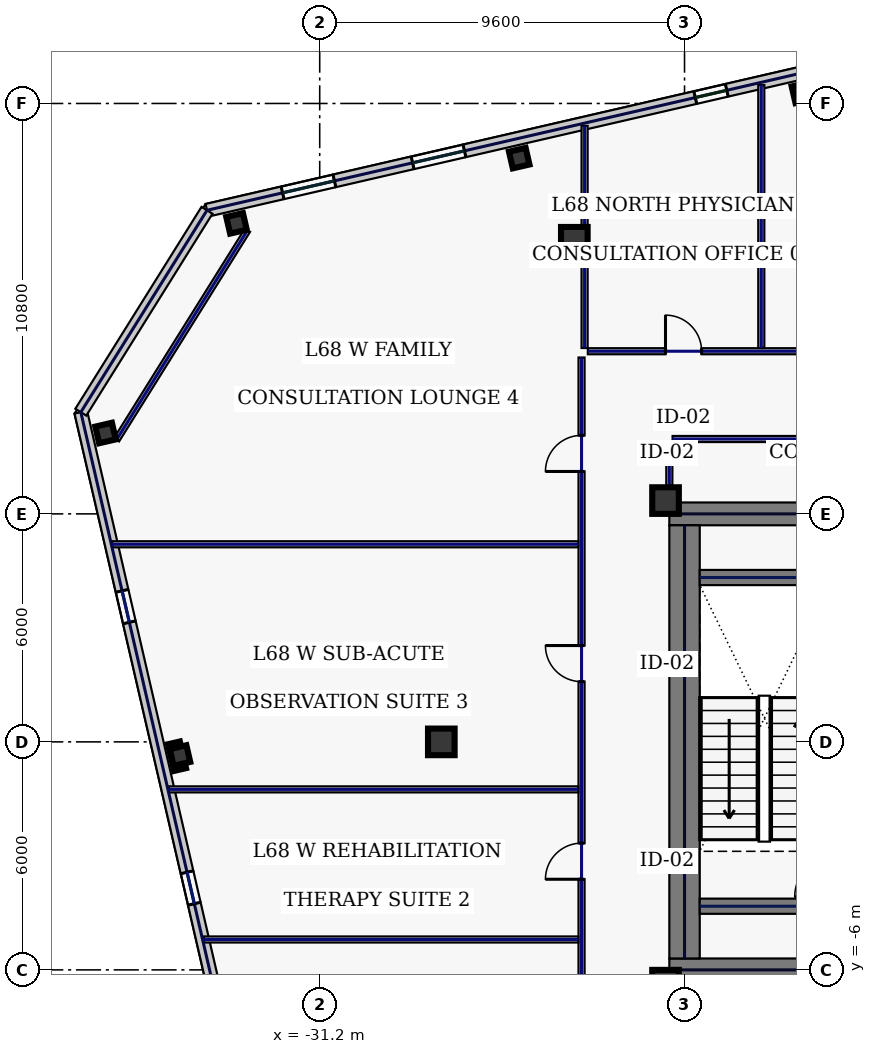
"""IFC4 building model, lengths in metres.
Left out: names, types, materials, properties, quantities, classifications, styles, units other than length and angle.
Written with IfcOpenShell. Run it as: python <this file> out.ifc"""

import sys

from ifc_helpers import new_model, si_unit, direction, frame, frame_2d, origin, origin_2d, place, context, subcontext, project, spatial, rectangle, hollow_rectangle, extrude, element, fill, save


model = new_model("IFC4")
c1 = context("Model", 3, precision=1e-05, world=origin(), true_north=direction((0.0, 1.0)))
c2 = subcontext(c1, "Body", "Model", "MODEL_VIEW")
j1 = project(units=[si_unit("LENGTHUNIT", "METRE"), si_unit("PLANEANGLEUNIT", "RADIAN")], contexts=[c1])
p1 = place(None, origin())
s1 = spatial("IfcSite", under=j1, at=p1, CompositionType="ELEMENT")
p2 = place(p1, origin())
s2 = spatial("IfcBuilding", under=s1, at=p2, CompositionType="ELEMENT")
p3 = place(p2, frame((0.0, 0.0, 293.0)))
s3 = spatial("IfcBuildingStorey", under=s2, at=p3, CompositionType="ELEMENT", Elevation=293.0)
for number, where, z_axis, x_axis in (
    (1, (-22.0, 6.0, 0.0), (0.0, 0.0, 1.0), (1.0, 0.0, 0.0)),
    (2, (-22.0, -6.0, 0.0), (0.0, 0.0, 1.0), (1.0, 0.0, 0.0)),
):
    element("IfcWall", number, at=place(p3, frame(where, z_axis=z_axis, x_axis=x_axis)), inside=s3, PredefinedType="SHEAR", context=c2, shape_type="SweptSolid", body=[
        extrude(rectangle(XDim=11.5, YDim=0.6, at=frame_2d((5.75, 0.0))), origin(), (0.0, 0.0, 1.0), 3.74),
    ])
p4 = place(p3, frame((-21.6, -5.7, 0.0), z_axis=(0.0, 0.0, 1.0), x_axis=(0.0, 1.0, 0.0)))
e3 = element("IfcWall", 3, at=p4, inside=s3, PredefinedType="SHEAR", context=c2, shape_type="SweptSolid", body=[
    extrude(rectangle(XDim=11.4, YDim=0.8, at=frame_2d((5.7, 0.0))), origin(), (0.0, 0.0, 1.0), 3.74),
])
for number, where, z_axis, x_axis in (
    (4, (-21.2, -4.325, 0.0), (0.0, 0.0, 1.0), (1.0, 0.0, 0.0)),
    (5, (-21.2, 4.325, 0.0), (0.0, 0.0, 1.0), (1.0, 0.0, 0.0)),
):
    element("IfcWall", number, at=place(p3, frame(where, z_axis=z_axis, x_axis=x_axis)), inside=s3, PredefinedType="SHEAR", context=c2, shape_type="SweptSolid", body=[
        extrude(rectangle(XDim=3.4, YDim=0.4, at=frame_2d((1.7, 0.0))), origin(), (0.0, 0.0, 1.0), 3.74),
    ])
for number, where, z_axis, x_axis in (
    (6, (-22.1, -6.35, 0.0), (0.0, 0.0, 1.0), (1.0, 0.0, 0.0)),
    (7, (-22.1, 6.35, 0.0), (0.0, 0.0, 1.0), (1.0, 0.0, 0.0)),
    (8, (-24.5, 13.2, 0.0), (0.0, 0.0, 1.0), (1.0, 0.0, 0.0)),
    (9, (-28.0, 0.0, 0.0), (0.0, 0.0, 1.0), (1.0, 0.0, 0.0)),
):
    element("IfcColumn", number, at=place(p3, frame(where, z_axis=z_axis, x_axis=x_axis)), inside=s3, PredefinedType="COLUMN", context=c2, shape_type="SweptSolid", body=[
        extrude(hollow_rectangle(XDim=0.7, YDim=0.7, WallThickness=0.032, at=origin_2d()), origin(), (0.0, 0.0, 1.0), 3.74),
    ])
for number, where, z_axis, x_axis in (
    (10, (-18.511, 17.08, 0.0), (0.0, 0.0, 1.0), (0.974, 0.225, 0.0)),
    (11, (-25.95, 15.362, 0.0), (0.0, 0.0, 1.0), (0.974, 0.225, 0.0)),
    (12, (-33.389, 13.645, 0.0), (0.0, 0.0, 1.0), (0.974, 0.225, 0.0)),
    (13, (-36.836, 8.128, 0.0), (0.0, 0.0, 1.0), (0.974, 0.225, 0.0)),
    (14, (-34.877, -0.359, 0.0), (0.0, 0.0, 1.0), (0.974, 0.225, 0.0)),
):
    element("IfcColumn", number, at=place(p3, frame(where, z_axis=z_axis, x_axis=x_axis)), inside=s3, PredefinedType="COLUMN", context=c2, shape_type="SweptSolid", body=[
        extrude(hollow_rectangle(XDim=0.45, YDim=0.45, WallThickness=0.022, at=origin_2d()), origin(), (0.0, 0.0, 1.0), 3.74),
    ])
p5 = place(p3, frame((-17.245, 17.895, 0.0), z_axis=(0.0, 0.0, 1.0), x_axis=(-0.97437318493, -0.224937539085, 0.0)))
e15 = element("IfcWall", 15, at=p5, inside=s3, PredefinedType="STANDARD", context=c2, shape_type="SweptSolid", body=[
    extrude(rectangle(XDim=17.366, YDim=0.34, at=frame_2d((8.683, 0.0))), origin(), (0.0, 0.0, 1.0), 3.74),
])
p6 = place(p5, frame((13.925, 0.0, 1.0)))
e16 = element("IfcOpeningElement", 16, at=p6, cuts=e15, PredefinedType="OPENING", context=c2, shape_type="SweptSolid", body=[
    extrude(rectangle(XDim=1.4, YDim=1.85, at=frame_2d((0.7, 0.925))), frame((0.0, 0.18, 0.0), z_axis=(0.0, -1.0, 0.0), x_axis=(1.0, 0.0, 0.0)), (0.0, 0.0, 1.0), 0.36),
])
p7 = place(p5, frame((10.413, 0.0, 1.0)))
e17 = element("IfcOpeningElement", 17, at=p7, cuts=e15, PredefinedType="OPENING", context=c2, shape_type="SweptSolid", body=[
    extrude(rectangle(XDim=1.4, YDim=1.85, at=frame_2d((0.7, 0.925))), frame((0.0, 0.18, 0.0), z_axis=(0.0, -1.0, 0.0), x_axis=(1.0, 0.0, 0.0)), (0.0, 0.0, 1.0), 0.36),
])
p8 = place(p5, frame((3.329, 0.0, 1.0)))
e18 = element("IfcOpeningElement", 18, at=p8, cuts=e15, PredefinedType="OPENING", context=c2, shape_type="SweptSolid", body=[
    extrude(rectangle(XDim=0.85, YDim=1.85, at=frame_2d((0.425, 0.925))), frame((0.0, 0.18, 0.0), z_axis=(0.0, -1.0, 0.0), x_axis=(1.0, 0.0, 0.0)), (0.0, 0.0, 1.0), 0.36),
])
p9 = place(p3, frame((-37.486, 8.676, 0.0), z_axis=(0.0, 0.0, 1.0), x_axis=(0.224953091034, -0.974369594576, 0.0)))
e19 = element("IfcWall", 19, at=p9, inside=s3, PredefinedType="STANDARD", context=c2, shape_type="SweptSolid", body=[
    extrude(rectangle(XDim=36.2, YDim=0.34, at=frame_2d((18.1, 0.0))), origin(), (0.0, 0.0, 1.0), 3.74),
])
p10 = place(p9, frame((4.825, 0.0, 0.75)))
e20 = element("IfcOpeningElement", 20, at=p10, cuts=e19, PredefinedType="OPENING", context=c2, shape_type="SweptSolid", body=[
    extrude(rectangle(XDim=0.85, YDim=1.85, at=frame_2d((0.425, 0.925))), frame((0.0, 0.18, 0.0), z_axis=(0.0, -1.0, 0.0), x_axis=(1.0, 0.0, 0.0)), (0.0, 0.0, 1.0), 0.36),
])
p11 = place(p9, frame((12.425, 0.0, 0.75)))
e21 = element("IfcOpeningElement", 21, at=p11, cuts=e19, PredefinedType="OPENING", context=c2, shape_type="SweptSolid", body=[
    extrude(rectangle(XDim=0.85, YDim=1.85, at=frame_2d((0.425, 0.925))), frame((0.0, 0.18, 0.0), z_axis=(0.0, -1.0, 0.0), x_axis=(1.0, 0.0, 0.0)), (0.0, 0.0, 1.0), 0.36),
])
p12 = place(p9, frame((21.825, 0.0, 0.58)))
e22 = element("IfcOpeningElement", 22, at=p12, cuts=e19, PredefinedType="OPENING", context=c2, shape_type="SweptSolid", body=[
    extrude(rectangle(XDim=1.6, YDim=2.3, at=frame_2d((0.8, 1.15))), frame((0.0, 0.18, 0.0), z_axis=(0.0, -1.0, 0.0), x_axis=(1.0, 0.0, 0.0)), (0.0, 0.0, 1.0), 0.36),
])
p13 = place(p9, frame((30.875, 0.0, 0.58)))
e23 = element("IfcOpeningElement", 23, at=p13, cuts=e19, PredefinedType="OPENING", context=c2, shape_type="SweptSolid", body=[
    extrude(rectangle(XDim=1.6, YDim=2.3, at=frame_2d((0.8, 1.15))), frame((0.0, 0.18, 0.0), z_axis=(0.0, -1.0, 0.0), x_axis=(1.0, 0.0, 0.0)), (0.0, 0.0, 1.0), 0.36),
])
p14 = place(p3, frame((-34.166, 13.989, 0.0), z_axis=(0.0, 0.0, 1.0), x_axis=(-0.529935887993, -0.848037708252, 0.0)))
e24 = element("IfcWall", 24, at=p14, inside=s3, PredefinedType="STANDARD", context=c2, shape_type="SweptSolid", body=[
    extrude(rectangle(XDim=6.265, YDim=0.34, at=frame_2d((3.133, 0.0))), origin(), (0.0, 0.0, 1.0), 3.74),
])
p15 = place(p3, frame((-33.1, 13.465, 0.0), z_axis=(0.0, 0.0, 1.0), x_axis=(-0.529958457806, -0.848023604035, 0.0)))
e25 = element("IfcWall", 25, at=p15, inside=s3, PredefinedType="PARTITIONING", context=c2, shape_type="SweptSolid", body=[
    extrude(rectangle(XDim=6.505, YDim=0.16, at=frame_2d((3.252, 0.0))), origin(), (0.0, 0.0, 1.0), 3.74),
])
p16 = place(p3, frame((-24.31, -10.015, 0.0), z_axis=(0.0, 0.0, 1.0), x_axis=(0.0, 1.0, 0.0)))
e26 = element("IfcWall", 26, at=p16, inside=s3, PredefinedType="PARTITIONING", context=c2, shape_type="SweptSolid", body=[
    extrude(rectangle(XDim=20.13, YDim=0.16, at=frame_2d((10.065, 0.0))), origin(), (0.0, 0.0, 1.0), 3.74),
])
p17 = place(p16, frame((2.169, 0.0, 0.0)))
e27 = element("IfcOpeningElement", 27, at=p17, cuts=e26, PredefinedType="OPENING", context=c2, shape_type="SweptSolid", body=[
    extrude(rectangle(XDim=0.95, YDim=2.2, at=frame_2d((0.475, 1.1))), frame((0.0, 0.09, 0.0), z_axis=(0.0, -1.0, 0.0), x_axis=(1.0, 0.0, 0.0)), (0.0, 0.0, 1.0), 0.18),
])
p18 = place(p16, frame((6.4, 0.0, 0.0)))
e28 = element("IfcOpeningElement", 28, at=p18, cuts=e26, PredefinedType="OPENING", context=c2, shape_type="SweptSolid", body=[
    extrude(rectangle(XDim=0.95, YDim=2.2, at=frame_2d((0.475, 1.1))), frame((0.0, 0.09, 0.0), z_axis=(0.0, -1.0, 0.0), x_axis=(1.0, 0.0, 0.0)), (0.0, 0.0, 1.0), 0.18),
])
p19 = place(p16, frame((11.6, 0.0, 0.0)))
e29 = element("IfcOpeningElement", 29, at=p19, cuts=e26, PredefinedType="OPENING", context=c2, shape_type="SweptSolid", body=[
    extrude(rectangle(XDim=0.95, YDim=2.2, at=frame_2d((0.475, 1.1))), frame((0.0, 0.09, 0.0), z_axis=(0.0, -1.0, 0.0), x_axis=(1.0, 0.0, 0.0)), (0.0, 0.0, 1.0), 0.18),
])
p20 = place(p16, frame((17.131, 0.0, 0.0)))
e30 = element("IfcOpeningElement", 30, at=p20, cuts=e26, PredefinedType="OPENING", context=c2, shape_type="SweptSolid", body=[
    extrude(rectangle(XDim=0.95, YDim=2.2, at=frame_2d((0.475, 1.1))), frame((0.0, 0.09, 0.0), z_axis=(0.0, -1.0, 0.0), x_axis=(1.0, 0.0, 0.0)), (0.0, 0.0, 1.0), 0.18),
])
p21 = place(p3, frame((-24.145, 10.28, 0.0), z_axis=(0.0, 0.0, 1.0), x_axis=(1.0, 0.0, 0.0)))
e31 = element("IfcWall", 31, at=p21, inside=s3, PredefinedType="PARTITIONING", context=c2, shape_type="SweptSolid", body=[
    extrude(rectangle(XDim=48.29, YDim=0.16, at=frame_2d((24.145, 0.0))), origin(), (0.0, 0.0, 1.0), 3.74),
])
p22 = place(p21, frame((2.044, 0.0, 0.0)))
e32 = element("IfcOpeningElement", 32, at=p22, cuts=e31, PredefinedType="OPENING", context=c2, shape_type="SweptSolid", body=[
    extrude(rectangle(XDim=0.95, YDim=2.2, at=frame_2d((0.475, 1.1))), frame((0.0, 0.09, 0.0), z_axis=(0.0, -1.0, 0.0), x_axis=(1.0, 0.0, 0.0)), (0.0, 0.0, 1.0), 0.18),
])
p23 = place(p21, frame((6.885, 0.0, 0.0)))
e33 = element("IfcOpeningElement", 33, at=p23, cuts=e31, PredefinedType="OPENING", context=c2, shape_type="SweptSolid", body=[
    extrude(rectangle(XDim=0.95, YDim=2.2, at=frame_2d((0.475, 1.1))), frame((0.0, 0.09, 0.0), z_axis=(0.0, -1.0, 0.0), x_axis=(1.0, 0.0, 0.0)), (0.0, 0.0, 1.0), 0.18),
])
p24 = place(p21, frame((14.8, 0.0, 0.0)))
e34 = element("IfcOpeningElement", 34, at=p24, cuts=e31, PredefinedType="OPENING", context=c2, shape_type="SweptSolid", body=[
    extrude(rectangle(XDim=1.3, YDim=2.2, at=frame_2d((0.65, 1.1))), frame((0.0, 0.09, 0.0), z_axis=(0.0, -1.0, 0.0), x_axis=(1.0, 0.0, 0.0)), (0.0, 0.0, 1.0), 0.18),
])
p25 = place(p21, frame((25.58, 0.0, 0.0)))
e35 = element("IfcOpeningElement", 35, at=p25, cuts=e31, PredefinedType="OPENING", context=c2, shape_type="SweptSolid", body=[
    extrude(rectangle(XDim=1.3, YDim=2.2, at=frame_2d((0.65, 1.1))), frame((0.0, 0.09, 0.0), z_axis=(0.0, -1.0, 0.0), x_axis=(1.0, 0.0, 0.0)), (0.0, 0.0, 1.0), 0.18),
])
p26 = place(p21, frame((36.355, 0.0, 0.0)))
e36 = element("IfcOpeningElement", 36, at=p26, cuts=e31, PredefinedType="OPENING", context=c2, shape_type="SweptSolid", body=[
    extrude(rectangle(XDim=0.95, YDim=2.2, at=frame_2d((0.475, 1.1))), frame((0.0, 0.09, 0.0), z_axis=(0.0, -1.0, 0.0), x_axis=(1.0, 0.0, 0.0)), (0.0, 0.0, 1.0), 0.18),
])
p27 = place(p21, frame((44.401, 0.0, 0.0)))
e37 = element("IfcOpeningElement", 37, at=p27, cuts=e31, PredefinedType="OPENING", context=c2, shape_type="SweptSolid", body=[
    extrude(rectangle(XDim=1.3, YDim=2.2, at=frame_2d((0.65, 1.1))), frame((0.0, 0.09, 0.0), z_axis=(0.0, -1.0, 0.0), x_axis=(1.0, 0.0, 0.0)), (0.0, 0.0, 1.0), 0.18),
])
p28 = place(p3, frame((-10.715, 7.97, 0.0), z_axis=(0.0, 0.0, 1.0), x_axis=(-1.0, 0.0, 0.0)))
e38 = element("IfcWall", 38, at=p28, inside=s3, PredefinedType="PARTITIONING", context=c2, shape_type="SweptSolid", body=[
    extrude(rectangle(XDim=11.2, YDim=0.16, at=frame_2d((5.6, 0.0))), origin(), (0.0, 0.0, 1.0), 3.74),
])
p29 = place(p3, frame((-22.0, 7.885, 0.0), z_axis=(0.0, 0.0, 1.0), x_axis=(0.0, -1.0, 0.0)))
e39 = element("IfcWall", 39, at=p29, inside=s3, PredefinedType="PARTITIONING", context=c2, shape_type="SweptSolid", body=[
    extrude(rectangle(XDim=1.465, YDim=0.16, at=frame_2d((0.732, 0.0))), origin(), (0.0, 0.0, 1.0), 3.74),
])
p30 = place(p3, frame((-24.23, 10.365, 0.0), z_axis=(0.0, 0.0, 1.0), x_axis=(0.0, 1.0, 0.0)))
e40 = element("IfcWall", 40, at=p30, inside=s3, PredefinedType="PARTITIONING", context=c2, shape_type="SweptSolid", body=[
    extrude(rectangle(XDim=5.846, YDim=0.16, at=frame_2d((2.923, 0.0))), origin(), (0.0, 0.0, 1.0), 3.74),
])
p31 = place(p3, frame((-19.58, 10.365, 0.0), z_axis=(0.0, 0.0, 1.0), x_axis=(0.0, 1.0, 0.0)))
e41 = element("IfcWall", 41, at=p31, inside=s3, PredefinedType="PARTITIONING", context=c2, shape_type="SweptSolid", body=[
    extrude(rectangle(XDim=6.919, YDim=0.16, at=frame_2d((3.46, 0.0))), origin(), (0.0, 0.0, 1.0), 3.74),
])
p32 = place(p3, frame((-34.262, -5.2, 0.0), z_axis=(0.0, 0.0, 1.0), x_axis=(1.0, 0.0, 0.0)))
e42 = element("IfcWall", 42, at=p32, inside=s3, PredefinedType="PARTITIONING", context=c2, shape_type="SweptSolid", body=[
    extrude(rectangle(XDim=9.867, YDim=0.16, at=frame_2d((4.933, 0.0))), origin(), (0.0, 0.0, 1.0), 3.74),
])
p33 = place(p3, frame((-35.174, -1.25, 0.0), z_axis=(0.0, 0.0, 1.0), x_axis=(1.0, 0.0, 0.0)))
e43 = element("IfcWall", 43, at=p33, inside=s3, PredefinedType="PARTITIONING", context=c2, shape_type="SweptSolid", body=[
    extrude(rectangle(XDim=10.779, YDim=0.16, at=frame_2d((5.389, 0.0))), origin(), (0.0, 0.0, 1.0), 3.74),
])
p34 = place(p3, frame((-36.663, 5.2, 0.0), z_axis=(0.0, 0.0, 1.0), x_axis=(1.0, 0.0, 0.0)))
e44 = element("IfcWall", 44, at=p34, inside=s3, PredefinedType="PARTITIONING", context=c2, shape_type="SweptSolid", body=[
    extrude(rectangle(XDim=12.268, YDim=0.16, at=frame_2d((6.134, 0.0))), origin(), (0.0, 0.0, 1.0), 3.74),
])
p35 = place(p6, origin())
e45 = element("IfcWindow", 45, at=p35, inside=s3, PartitioningType="SINGLE_PANEL", PredefinedType="WINDOW", context=c2, shape_type="SweptSolid", body=[
    extrude(rectangle(XDim=1.4, YDim=1.85, at=frame_2d((0.7, 0.925))), frame((0.0, 0.03, 0.0), z_axis=(0.0, -1.0, 0.0), x_axis=(1.0, 0.0, 0.0)), (0.0, 0.0, 1.0), 0.06),
])
fill(e16, e45)
p36 = place(p7, origin())
e46 = element("IfcWindow", 46, at=p36, inside=s3, PartitioningType="SINGLE_PANEL", PredefinedType="WINDOW", context=c2, shape_type="SweptSolid", body=[
    extrude(rectangle(XDim=1.4, YDim=1.85, at=frame_2d((0.7, 0.925))), frame((0.0, 0.03, 0.0), z_axis=(0.0, -1.0, 0.0), x_axis=(1.0, 0.0, 0.0)), (0.0, 0.0, 1.0), 0.06),
])
fill(e17, e46)
p37 = place(p8, origin())
e47 = element("IfcWindow", 47, at=p37, inside=s3, PartitioningType="SINGLE_PANEL", PredefinedType="WINDOW", context=c2, shape_type="SweptSolid", body=[
    extrude(rectangle(XDim=0.85, YDim=1.85, at=frame_2d((0.425, 0.925))), frame((0.0, 0.03, 0.0), z_axis=(0.0, -1.0, 0.0), x_axis=(1.0, 0.0, 0.0)), (0.0, 0.0, 1.0), 0.06),
])
fill(e18, e47)
p38 = place(p10, origin())
e48 = element("IfcWindow", 48, at=p38, inside=s3, PartitioningType="SINGLE_PANEL", PredefinedType="WINDOW", context=c2, shape_type="SweptSolid", body=[
    extrude(rectangle(XDim=0.85, YDim=1.85, at=frame_2d((0.425, 0.925))), frame((0.0, 0.03, 0.0), z_axis=(0.0, -1.0, 0.0), x_axis=(1.0, 0.0, 0.0)), (0.0, 0.0, 1.0), 0.06),
])
fill(e20, e48)
p39 = place(p11, origin())
e49 = element("IfcWindow", 49, at=p39, inside=s3, PartitioningType="SINGLE_PANEL", PredefinedType="WINDOW", context=c2, shape_type="SweptSolid", body=[
    extrude(rectangle(XDim=0.85, YDim=1.85, at=frame_2d((0.425, 0.925))), frame((0.0, 0.03, 0.0), z_axis=(0.0, -1.0, 0.0), x_axis=(1.0, 0.0, 0.0)), (0.0, 0.0, 1.0), 0.06),
])
fill(e21, e49)
p40 = place(p22, origin())
e50 = element("IfcDoor", 50, at=p40, inside=s3, OperationType="SINGLE_SWING_LEFT", PredefinedType="DOOR", context=c2, shape_type="SweptSolid", body=[
    extrude(rectangle(XDim=0.95, YDim=2.2, at=frame_2d((0.475, 1.1))), frame((0.0, 0.025, 0.0), z_axis=(0.0, -1.0, 0.0), x_axis=(1.0, 0.0, 0.0)), (0.0, 0.0, 1.0), 0.05),
])
fill(e32, e50)
p41 = place(p18, origin())
e51 = element("IfcDoor", 51, at=p41, inside=s3, OperationType="SINGLE_SWING_LEFT", PredefinedType="DOOR", context=c2, shape_type="SweptSolid", body=[
    extrude(rectangle(XDim=0.95, YDim=2.2, at=frame_2d((0.475, 1.1))), frame((0.0, 0.025, 0.0), z_axis=(0.0, -1.0, 0.0), x_axis=(1.0, 0.0, 0.0)), (0.0, 0.0, 1.0), 0.05),
])
fill(e28, e51)
p42 = place(p19, origin())
e52 = element("IfcDoor", 52, at=p42, inside=s3, OperationType="SINGLE_SWING_RIGHT", PredefinedType="DOOR", context=c2, shape_type="SweptSolid", body=[
    extrude(rectangle(XDim=0.95, YDim=2.2, at=frame_2d((0.475, 1.1))), frame((0.0, 0.025, 0.0), z_axis=(0.0, -1.0, 0.0), x_axis=(1.0, 0.0, 0.0)), (0.0, 0.0, 1.0), 0.05),
])
fill(e29, e52)
p43 = place(p20, origin())
e53 = element("IfcDoor", 53, at=p43, inside=s3, OperationType="SINGLE_SWING_LEFT", PredefinedType="DOOR", context=c2, shape_type="SweptSolid", body=[
    extrude(rectangle(XDim=0.95, YDim=2.2, at=frame_2d((0.475, 1.1))), frame((0.0, 0.025, 0.0), z_axis=(0.0, -1.0, 0.0), x_axis=(1.0, 0.0, 0.0)), (0.0, 0.0, 1.0), 0.05),
])
fill(e30, e53)
save(model, sys.argv[1])
